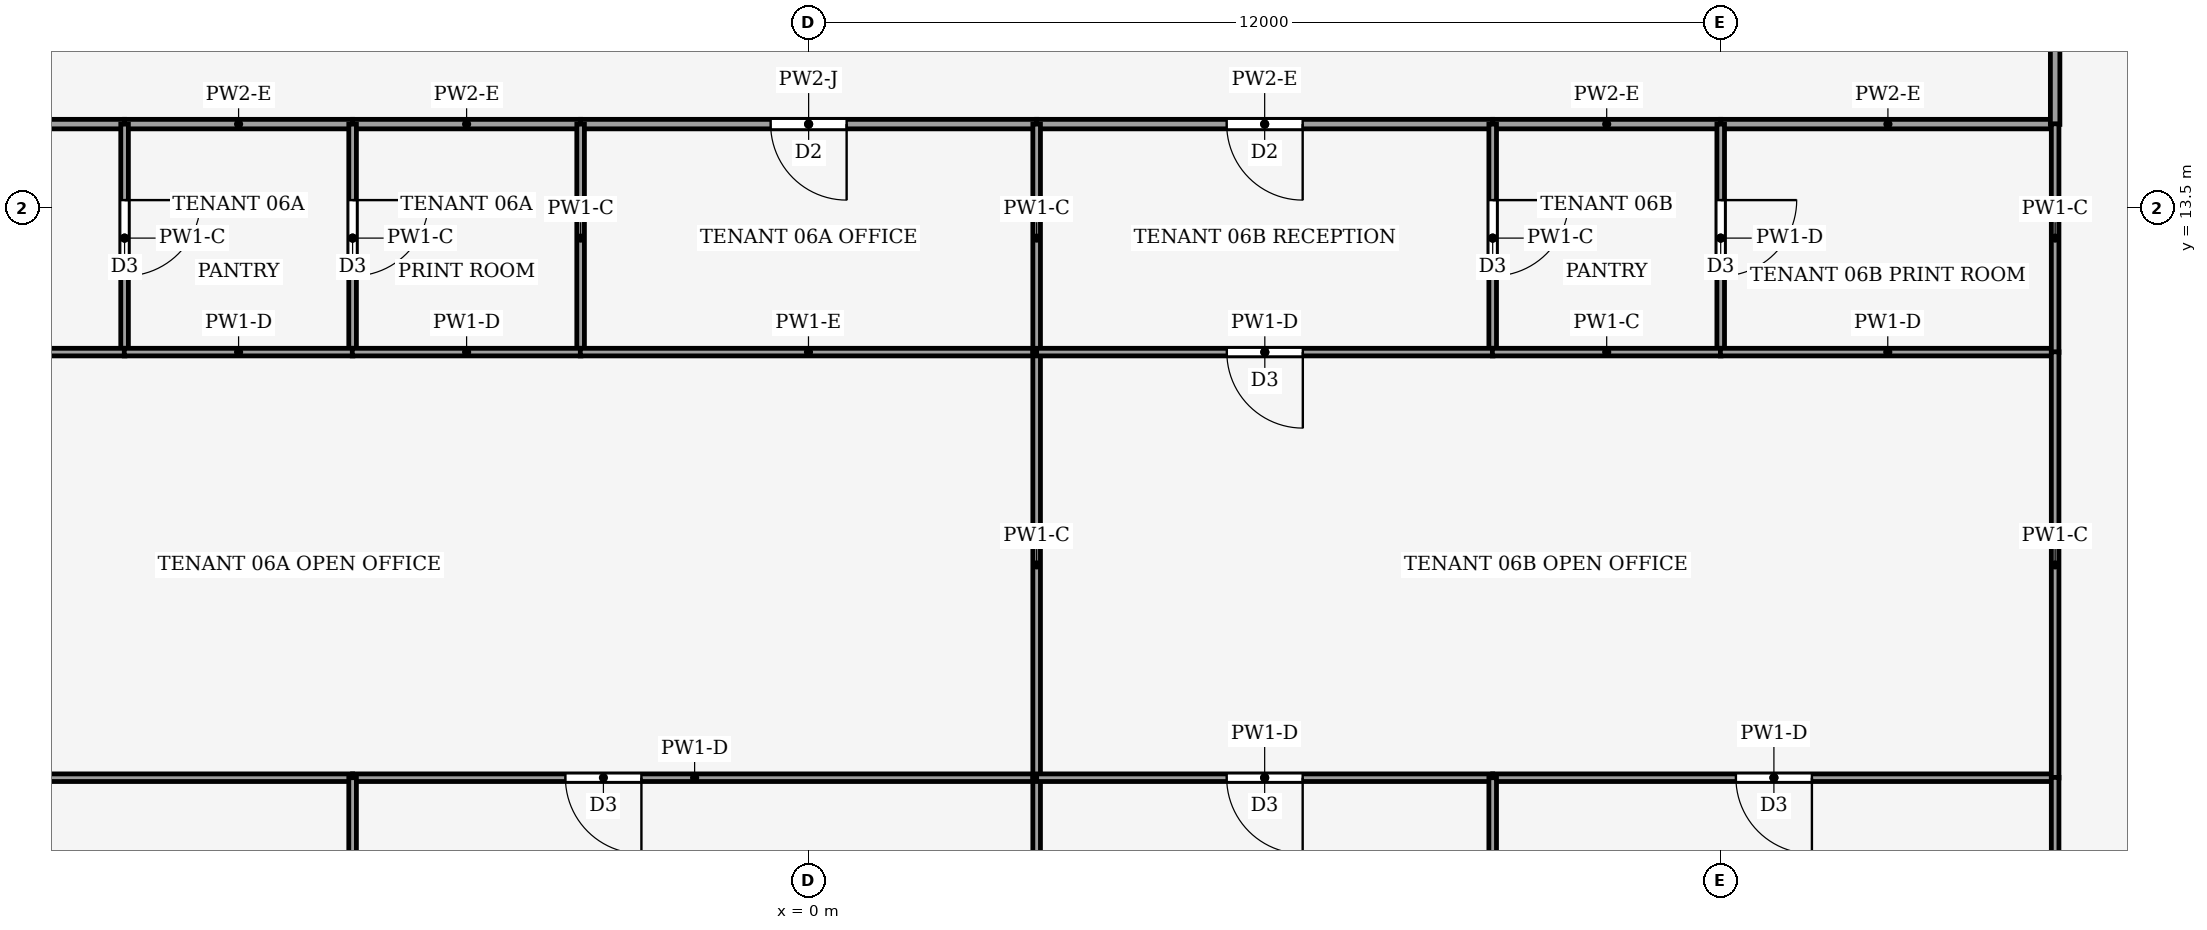
"""IFC4 building model, lengths in metres.
Left out: names, types, materials, properties, quantities, classifications, styles, units other than length and angle.
Written with IfcOpenShell. Run it as: python <this file> out.ifc"""

import sys

from ifc_helpers import new_model, si_unit, direction, frame, frame_2d, origin, place, context, subcontext, project, spatial, rectangle, extrude, element, fill, save


model = new_model("IFC4")
c1 = context("Model", 3, precision=1e-05, world=origin(), true_north=direction((0.0, 1.0)))
c2 = subcontext(c1, "Body", "Model", "MODEL_VIEW")
j1 = project(units=[si_unit("LENGTHUNIT", "METRE"), si_unit("PLANEANGLEUNIT", "RADIAN")], contexts=[c1])
p1 = place(None, origin())
s1 = spatial("IfcSite", under=j1, at=p1, CompositionType="ELEMENT")
p2 = place(p1, origin())
s2 = spatial("IfcBuilding", under=s1, at=p2, CompositionType="ELEMENT")
p3 = place(p2, frame((0.0, 0.0, 30.0)))
s3 = spatial("IfcBuildingStorey", under=s2, at=p3, CompositionType="ELEMENT", Elevation=30.0)
p4 = place(p3, frame((-9.0, 14.6, 0.0), z_axis=(0.0, 0.0, 1.0), x_axis=(-1.0, 0.0, 0.0)))
e1 = element("IfcWall", 1, at=p4, inside=s3, PredefinedType="PARTITIONING", context=c2, shape_type="SweptSolid", body=[
    extrude(rectangle(XDim=7.4, YDim=0.125, at=frame_2d((3.7, 0.0))), origin(), (0.0, 0.0, 1.0), 3.29),
])
p5 = place(p4, frame((3.2, 0.0, 0.0)))
e2 = element("IfcOpeningElement", 2, at=p5, cuts=e1, PredefinedType="OPENING", context=c2, shape_type="SweptSolid", body=[
    extrude(rectangle(XDim=1.0, YDim=2.1, at=frame_2d((0.5, 1.05))), frame((0.0, 0.073, 0.0), z_axis=(0.0, -1.0, 0.0), x_axis=(1.0, 0.0, 0.0)), (0.0, 0.0, 1.0), 0.145),
])
for number, where, z_axis, x_axis in (
    (3, (-9.0, 14.6, 0.0), (0.0, 0.0, 1.0), (1.0, 0.0, 0.0)),
    (4, (-6.0, 14.6, 0.0), (0.0, 0.0, 1.0), (1.0, 0.0, 0.0)),
):
    element("IfcWall", number, at=place(p3, frame(where, z_axis=z_axis, x_axis=x_axis)), inside=s3, PredefinedType="PARTITIONING", context=c2, shape_type="SweptSolid", body=[
        extrude(rectangle(XDim=3.0, YDim=0.125, at=frame_2d((1.5, 0.0))), origin(), (0.0, 0.0, 1.0), 3.29),
    ])
p6 = place(p3, frame((3.0, 14.6, 0.0), z_axis=(0.0, 0.0, 1.0), x_axis=(-1.0, 0.0, 0.0)))
e5 = element("IfcWall", 5, at=p6, inside=s3, PredefinedType="PARTITIONING", context=c2, shape_type="SweptSolid", body=[
    extrude(rectangle(XDim=6.0, YDim=0.125, at=frame_2d((3.0, 0.0))), origin(), (0.0, 0.0, 1.0), 3.34),
])
p7 = place(p6, frame((2.5, 0.0, 0.0)))
e6 = element("IfcOpeningElement", 6, at=p7, cuts=e5, PredefinedType="OPENING", context=c2, shape_type="SweptSolid", body=[
    extrude(rectangle(XDim=1.0, YDim=2.1, at=frame_2d((0.5, 1.05))), frame((0.0, 0.073, 0.0), z_axis=(0.0, -1.0, 0.0), x_axis=(1.0, 0.0, 0.0)), (0.0, 0.0, 1.0), 0.145),
])
p8 = place(p3, frame((9.0, 14.6, 0.0), z_axis=(0.0, 0.0, 1.0), x_axis=(-1.0, 0.0, 0.0)))
e7 = element("IfcWall", 7, at=p8, inside=s3, PredefinedType="PARTITIONING", context=c2, shape_type="SweptSolid", body=[
    extrude(rectangle(XDim=6.0, YDim=0.125, at=frame_2d((3.0, 0.0))), origin(), (0.0, 0.0, 1.0), 3.29),
])
p9 = place(p8, frame((2.5, 0.0, 0.0)))
e8 = element("IfcOpeningElement", 8, at=p9, cuts=e7, PredefinedType="OPENING", context=c2, shape_type="SweptSolid", body=[
    extrude(rectangle(XDim=1.0, YDim=2.1, at=frame_2d((0.5, 1.05))), frame((0.0, 0.073, 0.0), z_axis=(0.0, -1.0, 0.0), x_axis=(1.0, 0.0, 0.0)), (0.0, 0.0, 1.0), 0.145),
])
p10 = place(p3, frame((9.0, 14.6, 0.0), z_axis=(0.0, 0.0, 1.0), x_axis=(1.0, 0.0, 0.0)))
e9 = element("IfcWall", 9, at=p10, inside=s3, PredefinedType="PARTITIONING", context=c2, shape_type="SweptSolid", body=[
    extrude(rectangle(XDim=3.0, YDim=0.125, at=frame_2d((1.5, 0.0))), origin(), (0.0, 0.0, 1.0), 3.29),
])
p11 = place(p3, frame((12.0, 14.6, 0.0), z_axis=(0.0, 0.0, 1.0), x_axis=(1.0, 0.0, 0.0)))
e10 = element("IfcWall", 10, at=p11, inside=s3, PredefinedType="PARTITIONING", context=c2, shape_type="SweptSolid", body=[
    extrude(rectangle(XDim=4.4, YDim=0.125, at=frame_2d((2.2, 0.0))), origin(), (0.0, 0.0, 1.0), 3.29),
])
p12 = place(p3, frame((16.4, 18.0, 0.0), z_axis=(0.0, 0.0, 1.0), x_axis=(0.0, -1.0, 0.0)))
e11 = element("IfcWall", 11, at=p12, inside=s3, PredefinedType="PARTITIONING", context=c2, shape_type="SweptSolid", body=[
    extrude(rectangle(XDim=3.404, YDim=0.125, at=frame_2d((1.702, 0.0))), origin(), (0.0, 0.0, 1.0), 3.14),
])
p13 = place(p12, frame((1.202, 0.0, 0.0)))
e12 = element("IfcOpeningElement", 12, at=p13, cuts=e11, PredefinedType="OPENING", context=c2, shape_type="SweptSolid", body=[
    extrude(rectangle(XDim=1.0, YDim=2.1, at=frame_2d((0.5, 1.05))), frame((0.0, 0.073, 0.0), z_axis=(0.0, -1.0, 0.0), x_axis=(1.0, 0.0, 0.0)), (0.0, 0.0, 1.0), 0.145),
])
p14 = place(p3, frame((-9.0, 14.6, 0.0), z_axis=(0.0, 0.0, 1.0), x_axis=(0.0, -1.0, 0.0)))
e13 = element("IfcWall", 13, at=p14, inside=s3, PredefinedType="PARTITIONING", context=c2, shape_type="SweptSolid", body=[
    extrude(rectangle(XDim=3.0, YDim=0.1, at=frame_2d((1.5, 0.0))), origin(), (0.0, 0.0, 1.0), 3.87),
])
p15 = place(p14, frame((1.0, 0.0, 0.0)))
e14 = element("IfcOpeningElement", 14, at=p15, cuts=e13, PredefinedType="OPENING", context=c2, shape_type="SweptSolid", body=[
    extrude(rectangle(XDim=1.0, YDim=2.1, at=frame_2d((0.5, 1.05))), frame((0.0, 0.06, 0.0), z_axis=(0.0, -1.0, 0.0), x_axis=(1.0, 0.0, 0.0)), (0.0, 0.0, 1.0), 0.12),
])
p16 = place(p3, frame((-8.996, 11.6, 0.0), z_axis=(0.0, 0.0, 1.0), x_axis=(-1.0, 0.0, 0.0)))
e15 = element("IfcWall", 15, at=p16, inside=s3, PredefinedType="PARTITIONING", context=c2, shape_type="SweptSolid", body=[
    extrude(rectangle(XDim=7.404, YDim=0.1, at=frame_2d((3.702, 0.0))), origin(), (0.0, 0.0, 1.0), 3.29),
])
p17 = place(p16, frame((3.202, 0.0, 0.0)))
e16 = element("IfcOpeningElement", 16, at=p17, cuts=e15, PredefinedType="OPENING", context=c2, shape_type="SweptSolid", body=[
    extrude(rectangle(XDim=1.0, YDim=2.1, at=frame_2d((0.5, 1.05))), frame((0.0, 0.06, 0.0), z_axis=(0.0, -1.0, 0.0), x_axis=(1.0, 0.0, 0.0)), (0.0, 0.0, 1.0), 0.12),
])
p18 = place(p3, frame((-6.0, 14.6, 0.0), z_axis=(0.0, 0.0, 1.0), x_axis=(0.0, -1.0, 0.0)))
e17 = element("IfcWall", 17, at=p18, inside=s3, PredefinedType="PARTITIONING", context=c2, shape_type="SweptSolid", body=[
    extrude(rectangle(XDim=3.0, YDim=0.1, at=frame_2d((1.5, 0.0))), origin(), (0.0, 0.0, 1.0), 3.87),
])
p19 = place(p18, frame((1.0, 0.0, 0.0)))
e18 = element("IfcOpeningElement", 18, at=p19, cuts=e17, PredefinedType="OPENING", context=c2, shape_type="SweptSolid", body=[
    extrude(rectangle(XDim=1.0, YDim=2.1, at=frame_2d((0.5, 1.05))), frame((0.0, 0.06, 0.0), z_axis=(0.0, -1.0, 0.0), x_axis=(1.0, 0.0, 0.0)), (0.0, 0.0, 1.0), 0.12),
])
p20 = place(p3, frame((-9.004, 11.6, 0.0), z_axis=(0.0, 0.0, 1.0), x_axis=(1.0, 0.0, 0.0)))
e19 = element("IfcWall", 19, at=p20, inside=s3, PredefinedType="PARTITIONING", context=c2, shape_type="SweptSolid", body=[
    extrude(rectangle(XDim=3.008, YDim=0.1, at=frame_2d((1.504, 0.0))), origin(), (0.0, 0.0, 1.0), 3.29),
])
p21 = place(p3, frame((-3.0, 11.6, 0.0), z_axis=(0.0, 0.0, 1.0), x_axis=(0.0, 1.0, 0.0)))
e20 = element("IfcWall", 20, at=p21, inside=s3, PredefinedType="PARTITIONING", context=c2, shape_type="SweptSolid", body=[
    extrude(rectangle(XDim=3.0, YDim=0.1, at=frame_2d((1.5, 0.0))), origin(), (0.0, 0.0, 1.0), 3.87),
])
p22 = place(p3, frame((-6.004, 11.6, 0.0), z_axis=(0.0, 0.0, 1.0), x_axis=(1.0, 0.0, 0.0)))
e21 = element("IfcWall", 21, at=p22, inside=s3, PredefinedType="PARTITIONING", context=c2, shape_type="SweptSolid", body=[
    extrude(rectangle(XDim=3.008, YDim=0.1, at=frame_2d((1.504, 0.0))), origin(), (0.0, 0.0, 1.0), 3.29),
])
p23 = place(p3, frame((-3.004, 11.6, 0.0), z_axis=(0.0, 0.0, 1.0), x_axis=(1.0, 0.0, 0.0)))
e22 = element("IfcWall", 22, at=p23, inside=s3, PredefinedType="PARTITIONING", context=c2, shape_type="SweptSolid", body=[
    extrude(rectangle(XDim=6.004, YDim=0.1, at=frame_2d((3.002, 0.0))), origin(), (0.0, 0.0, 1.0), 3.34),
])
p24 = place(p3, frame((3.0, 11.6, 0.0), z_axis=(0.0, 0.0, 1.0), x_axis=(0.0, 1.0, 0.0)))
e23 = element("IfcWall", 23, at=p24, inside=s3, PredefinedType="PARTITIONING", context=c2, shape_type="SweptSolid", body=[
    extrude(rectangle(XDim=3.0, YDim=0.1, at=frame_2d((1.5, 0.0))), origin(), (0.0, 0.0, 1.0), 3.87),
])
p25 = place(p3, frame((-6.0, 6.0, 0.0), z_axis=(0.0, 0.0, 1.0), x_axis=(-1.0, 0.0, 0.0)))
e24 = element("IfcWall", 24, at=p25, inside=s3, PredefinedType="PARTITIONING", context=c2, shape_type="SweptSolid", body=[
    extrude(rectangle(XDim=10.4, YDim=0.1, at=frame_2d((5.2, 0.0))), origin(), (0.0, 0.0, 1.0), 3.29),
])
p26 = place(p25, frame((4.7, 0.0, 0.0)))
e25 = element("IfcOpeningElement", 25, at=p26, cuts=e24, PredefinedType="OPENING", context=c2, shape_type="SweptSolid", body=[
    extrude(rectangle(XDim=1.0, YDim=2.1, at=frame_2d((0.5, 1.05))), frame((0.0, 0.06, 0.0), z_axis=(0.0, -1.0, 0.0), x_axis=(1.0, 0.0, 0.0)), (0.0, 0.0, 1.0), 0.12),
])
p27 = place(p3, frame((3.0, 6.0, 0.0), z_axis=(0.0, 0.0, 1.0), x_axis=(-1.0, 0.0, 0.0)))
e26 = element("IfcWall", 26, at=p27, inside=s3, PredefinedType="PARTITIONING", context=c2, shape_type="SweptSolid", body=[
    extrude(rectangle(XDim=9.0, YDim=0.1, at=frame_2d((4.5, 0.0))), origin(), (0.0, 0.0, 1.0), 3.29),
])
p28 = place(p27, frame((5.2, 0.0, 0.0)))
e27 = element("IfcOpeningElement", 27, at=p28, cuts=e26, PredefinedType="OPENING", context=c2, shape_type="SweptSolid", body=[
    extrude(rectangle(XDim=1.0, YDim=2.1, at=frame_2d((0.5, 1.05))), frame((0.0, 0.06, 0.0), z_axis=(0.0, -1.0, 0.0), x_axis=(1.0, 0.0, 0.0)), (0.0, 0.0, 1.0), 0.12),
])
p29 = place(p3, frame((3.0, 6.0, 0.0), z_axis=(0.0, 0.0, 1.0), x_axis=(0.0, 1.0, 0.0)))
e28 = element("IfcWall", 28, at=p29, inside=s3, PredefinedType="PARTITIONING", context=c2, shape_type="SweptSolid", body=[
    extrude(rectangle(XDim=5.6, YDim=0.1, at=frame_2d((2.8, 0.0))), origin(), (0.0, 0.0, 1.0), 3.87),
])
p30 = place(p3, frame((-6.0, 0.92, 0.0), z_axis=(0.0, 0.0, 1.0), x_axis=(0.0, 1.0, 0.0)))
e29 = element("IfcWall", 29, at=p30, inside=s3, PredefinedType="PARTITIONING", context=c2, shape_type="SweptSolid", body=[
    extrude(rectangle(XDim=5.08, YDim=0.1, at=frame_2d((2.54, 0.0))), origin(), (0.0, 0.0, 1.0), 3.04),
])
p31 = place(p3, frame((3.0, 1.17, 0.0), z_axis=(0.0, 0.0, 1.0), x_axis=(0.0, 1.0, 0.0)))
e30 = element("IfcWall", 30, at=p31, inside=s3, PredefinedType="PARTITIONING", context=c2, shape_type="SweptSolid", body=[
    extrude(rectangle(XDim=4.83, YDim=0.1, at=frame_2d((2.415, 0.0))), origin(), (0.0, 0.0, 1.0), 3.04),
])
p32 = place(p3, frame((9.0, 14.6, 0.0), z_axis=(0.0, 0.0, 1.0), x_axis=(0.0, -1.0, 0.0)))
e31 = element("IfcWall", 31, at=p32, inside=s3, PredefinedType="PARTITIONING", context=c2, shape_type="SweptSolid", body=[
    extrude(rectangle(XDim=3.0, YDim=0.1, at=frame_2d((1.5, 0.0))), origin(), (0.0, 0.0, 1.0), 3.87),
])
p33 = place(p32, frame((1.0, 0.0, 0.0)))
e32 = element("IfcOpeningElement", 32, at=p33, cuts=e31, PredefinedType="OPENING", context=c2, shape_type="SweptSolid", body=[
    extrude(rectangle(XDim=1.0, YDim=2.1, at=frame_2d((0.5, 1.05))), frame((0.0, 0.06, 0.0), z_axis=(0.0, -1.0, 0.0), x_axis=(1.0, 0.0, 0.0)), (0.0, 0.0, 1.0), 0.12),
])
p34 = place(p3, frame((9.004, 11.6, 0.0), z_axis=(0.0, 0.0, 1.0), x_axis=(-1.0, 0.0, 0.0)))
e33 = element("IfcWall", 33, at=p34, inside=s3, PredefinedType="PARTITIONING", context=c2, shape_type="SweptSolid", body=[
    extrude(rectangle(XDim=6.004, YDim=0.1, at=frame_2d((3.002, 0.0))), origin(), (0.0, 0.0, 1.0), 3.29),
])
p35 = place(p34, frame((2.502, 0.0, 0.0)))
e34 = element("IfcOpeningElement", 34, at=p35, cuts=e33, PredefinedType="OPENING", context=c2, shape_type="SweptSolid", body=[
    extrude(rectangle(XDim=1.0, YDim=2.1, at=frame_2d((0.5, 1.05))), frame((0.0, 0.06, 0.0), z_axis=(0.0, -1.0, 0.0), x_axis=(1.0, 0.0, 0.0)), (0.0, 0.0, 1.0), 0.12),
])
p36 = place(p3, frame((12.0, 14.6, 0.0), z_axis=(0.0, 0.0, 1.0), x_axis=(0.0, -1.0, 0.0)))
e35 = element("IfcWall", 35, at=p36, inside=s3, PredefinedType="PARTITIONING", context=c2, shape_type="SweptSolid", body=[
    extrude(rectangle(XDim=3.0, YDim=0.1, at=frame_2d((1.5, 0.0))), origin(), (0.0, 0.0, 1.0), 3.29),
])
p37 = place(p36, frame((1.0, 0.0, 0.0)))
e36 = element("IfcOpeningElement", 36, at=p37, cuts=e35, PredefinedType="OPENING", context=c2, shape_type="SweptSolid", body=[
    extrude(rectangle(XDim=1.0, YDim=2.1, at=frame_2d((0.5, 1.05))), frame((0.0, 0.06, 0.0), z_axis=(0.0, -1.0, 0.0), x_axis=(1.0, 0.0, 0.0)), (0.0, 0.0, 1.0), 0.12),
])
p38 = place(p3, frame((8.996, 11.6, 0.0), z_axis=(0.0, 0.0, 1.0), x_axis=(1.0, 0.0, 0.0)))
e37 = element("IfcWall", 37, at=p38, inside=s3, PredefinedType="PARTITIONING", context=c2, shape_type="SweptSolid", body=[
    extrude(rectangle(XDim=3.008, YDim=0.1, at=frame_2d((1.504, 0.0))), origin(), (0.0, 0.0, 1.0), 3.87),
])
p39 = place(p3, frame((11.996, 11.6, 0.0), z_axis=(0.0, 0.0, 1.0), x_axis=(1.0, 0.0, 0.0)))
e38 = element("IfcWall", 38, at=p39, inside=s3, PredefinedType="PARTITIONING", context=c2, shape_type="SweptSolid", body=[
    extrude(rectangle(XDim=4.404, YDim=0.1, at=frame_2d((2.202, 0.0))), origin(), (0.0, 0.0, 1.0), 3.29),
])
p40 = place(p3, frame((16.4, 11.596, 0.0), z_axis=(0.0, 0.0, 1.0), x_axis=(0.0, 1.0, 0.0)))
e39 = element("IfcWall", 39, at=p40, inside=s3, PredefinedType="PARTITIONING", context=c2, shape_type="SweptSolid", body=[
    extrude(rectangle(XDim=3.008, YDim=0.1, at=frame_2d((1.504, 0.0))), origin(), (0.0, 0.0, 1.0), 3.87),
])
p41 = place(p3, frame((9.0, 6.0, 0.0), z_axis=(0.0, 0.0, 1.0), x_axis=(-1.0, 0.0, 0.0)))
e40 = element("IfcWall", 40, at=p41, inside=s3, PredefinedType="PARTITIONING", context=c2, shape_type="SweptSolid", body=[
    extrude(rectangle(XDim=6.0, YDim=0.1, at=frame_2d((3.0, 0.0))), origin(), (0.0, 0.0, 1.0), 3.29),
])
p42 = place(p41, frame((2.5, 0.0, 0.0)))
e41 = element("IfcOpeningElement", 41, at=p42, cuts=e40, PredefinedType="OPENING", context=c2, shape_type="SweptSolid", body=[
    extrude(rectangle(XDim=1.0, YDim=2.1, at=frame_2d((0.5, 1.05))), frame((0.0, 0.06, 0.0), z_axis=(0.0, -1.0, 0.0), x_axis=(1.0, 0.0, 0.0)), (0.0, 0.0, 1.0), 0.12),
])
p43 = place(p3, frame((16.4, 6.0, 0.0), z_axis=(0.0, 0.0, 1.0), x_axis=(-1.0, 0.0, 0.0)))
e42 = element("IfcWall", 42, at=p43, inside=s3, PredefinedType="PARTITIONING", context=c2, shape_type="SweptSolid", body=[
    extrude(rectangle(XDim=7.4, YDim=0.1, at=frame_2d((3.7, 0.0))), origin(), (0.0, 0.0, 1.0), 3.29),
])
p44 = place(p43, frame((3.2, 0.0, 0.0)))
e43 = element("IfcOpeningElement", 43, at=p44, cuts=e42, PredefinedType="OPENING", context=c2, shape_type="SweptSolid", body=[
    extrude(rectangle(XDim=1.0, YDim=2.1, at=frame_2d((0.5, 1.05))), frame((0.0, 0.06, 0.0), z_axis=(0.0, -1.0, 0.0), x_axis=(1.0, 0.0, 0.0)), (0.0, 0.0, 1.0), 0.12),
])
p45 = place(p3, frame((16.4, 5.996, 0.0), z_axis=(0.0, 0.0, 1.0), x_axis=(0.0, 1.0, 0.0)))
e44 = element("IfcWall", 44, at=p45, inside=s3, PredefinedType="PARTITIONING", context=c2, shape_type="SweptSolid", body=[
    extrude(rectangle(XDim=5.608, YDim=0.1, at=frame_2d((2.804, 0.0))), origin(), (0.0, 0.0, 1.0), 3.87),
])
p46 = place(p3, frame((9.0, 0.67, 0.0), z_axis=(0.0, 0.0, 1.0), x_axis=(0.0, 1.0, 0.0)))
e45 = element("IfcWall", 45, at=p46, inside=s3, PredefinedType="PARTITIONING", context=c2, shape_type="SweptSolid", body=[
    extrude(rectangle(XDim=5.33, YDim=0.1, at=frame_2d((2.665, 0.0))), origin(), (0.0, 0.0, 1.0), 3.04),
])
p47 = place(p3, frame((16.4, 0.053, 0.0), z_axis=(0.0, 0.0, 1.0), x_axis=(0.0, 1.0, 0.0)))
e46 = element("IfcWall", 46, at=p47, inside=s3, PredefinedType="PARTITIONING", context=c2, shape_type="SweptSolid", body=[
    extrude(rectangle(XDim=5.951, YDim=0.1, at=frame_2d((2.975, 0.0))), origin(), (0.0, 0.0, 1.0), 3.04),
])
p48 = place(p7, origin())
e47 = element("IfcDoor", 47, at=p48, inside=s3, OperationType="SINGLE_SWING_RIGHT", PredefinedType="DOOR", context=c2, shape_type="SweptSolid", body=[
    extrude(rectangle(XDim=1.0, YDim=2.1, at=frame_2d((0.5, 1.05))), frame((0.0, 0.025, 0.0), z_axis=(0.0, -1.0, 0.0), x_axis=(1.0, 0.0, 0.0)), (0.0, 0.0, 1.0), 0.05),
])
fill(e6, e47)
p49 = place(p9, origin())
e48 = element("IfcDoor", 48, at=p49, inside=s3, OperationType="SINGLE_SWING_LEFT", PredefinedType="DOOR", context=c2, shape_type="SweptSolid", body=[
    extrude(rectangle(XDim=1.0, YDim=2.1, at=frame_2d((0.5, 1.05))), frame((0.0, 0.025, 0.0), z_axis=(0.0, -1.0, 0.0), x_axis=(1.0, 0.0, 0.0)), (0.0, 0.0, 1.0), 0.05),
])
fill(e8, e48)
p50 = place(p15, origin())
e49 = element("IfcDoor", 49, at=p50, inside=s3, OperationType="SINGLE_SWING_RIGHT", PredefinedType="DOOR", context=c2, shape_type="SweptSolid", body=[
    extrude(rectangle(XDim=1.0, YDim=2.1, at=frame_2d((0.5, 1.05))), frame((0.0, 0.025, 0.0), z_axis=(0.0, -1.0, 0.0), x_axis=(1.0, 0.0, 0.0)), (0.0, 0.0, 1.0), 0.05),
])
fill(e14, e49)
p51 = place(p19, origin())
e50 = element("IfcDoor", 50, at=p51, inside=s3, OperationType="SINGLE_SWING_RIGHT", PredefinedType="DOOR", context=c2, shape_type="SweptSolid", body=[
    extrude(rectangle(XDim=1.0, YDim=2.1, at=frame_2d((0.5, 1.05))), frame((0.0, 0.025, 0.0), z_axis=(0.0, -1.0, 0.0), x_axis=(1.0, 0.0, 0.0)), (0.0, 0.0, 1.0), 0.05),
])
fill(e18, e50)
p52 = place(p28, origin())
e51 = element("IfcDoor", 51, at=p52, inside=s3, OperationType="SINGLE_SWING_RIGHT", PredefinedType="DOOR", context=c2, shape_type="SweptSolid", body=[
    extrude(rectangle(XDim=1.0, YDim=2.1, at=frame_2d((0.5, 1.05))), frame((0.0, 0.025, 0.0), z_axis=(0.0, -1.0, 0.0), x_axis=(1.0, 0.0, 0.0)), (0.0, 0.0, 1.0), 0.05),
])
fill(e27, e51)
p53 = place(p33, origin())
e52 = element("IfcDoor", 52, at=p53, inside=s3, OperationType="SINGLE_SWING_LEFT", PredefinedType="DOOR", context=c2, shape_type="SweptSolid", body=[
    extrude(rectangle(XDim=1.0, YDim=2.1, at=frame_2d((0.5, 1.05))), frame((0.0, 0.025, 0.0), z_axis=(0.0, -1.0, 0.0), x_axis=(1.0, 0.0, 0.0)), (0.0, 0.0, 1.0), 0.05),
])
fill(e32, e52)
p54 = place(p35, origin())
e53 = element("IfcDoor", 53, at=p54, inside=s3, OperationType="SINGLE_SWING_RIGHT", PredefinedType="DOOR", context=c2, shape_type="SweptSolid", body=[
    extrude(rectangle(XDim=1.0, YDim=2.1, at=frame_2d((0.5, 1.05))), frame((0.0, 0.025, 0.0), z_axis=(0.0, -1.0, 0.0), x_axis=(1.0, 0.0, 0.0)), (0.0, 0.0, 1.0), 0.05),
])
fill(e34, e53)
p55 = place(p37, origin())
e54 = element("IfcDoor", 54, at=p55, inside=s3, OperationType="SINGLE_SWING_LEFT", PredefinedType="DOOR", context=c2, shape_type="SweptSolid", body=[
    extrude(rectangle(XDim=1.0, YDim=2.1, at=frame_2d((0.5, 1.05))), frame((0.0, 0.025, 0.0), z_axis=(0.0, -1.0, 0.0), x_axis=(1.0, 0.0, 0.0)), (0.0, 0.0, 1.0), 0.05),
])
fill(e36, e54)
p56 = place(p42, origin())
e55 = element("IfcDoor", 55, at=p56, inside=s3, OperationType="SINGLE_SWING_RIGHT", PredefinedType="DOOR", context=c2, shape_type="SweptSolid", body=[
    extrude(rectangle(XDim=1.0, YDim=2.1, at=frame_2d((0.5, 1.05))), frame((0.0, 0.025, 0.0), z_axis=(0.0, -1.0, 0.0), x_axis=(1.0, 0.0, 0.0)), (0.0, 0.0, 1.0), 0.05),
])
fill(e41, e55)
p57 = place(p44, origin())
e56 = element("IfcDoor", 56, at=p57, inside=s3, OperationType="SINGLE_SWING_LEFT", PredefinedType="DOOR", context=c2, shape_type="SweptSolid", body=[
    extrude(rectangle(XDim=1.0, YDim=2.1, at=frame_2d((0.5, 1.05))), frame((0.0, 0.025, 0.0), z_axis=(0.0, -1.0, 0.0), x_axis=(1.0, 0.0, 0.0)), (0.0, 0.0, 1.0), 0.05),
])
fill(e43, e56)
save(model, sys.argv[1])
